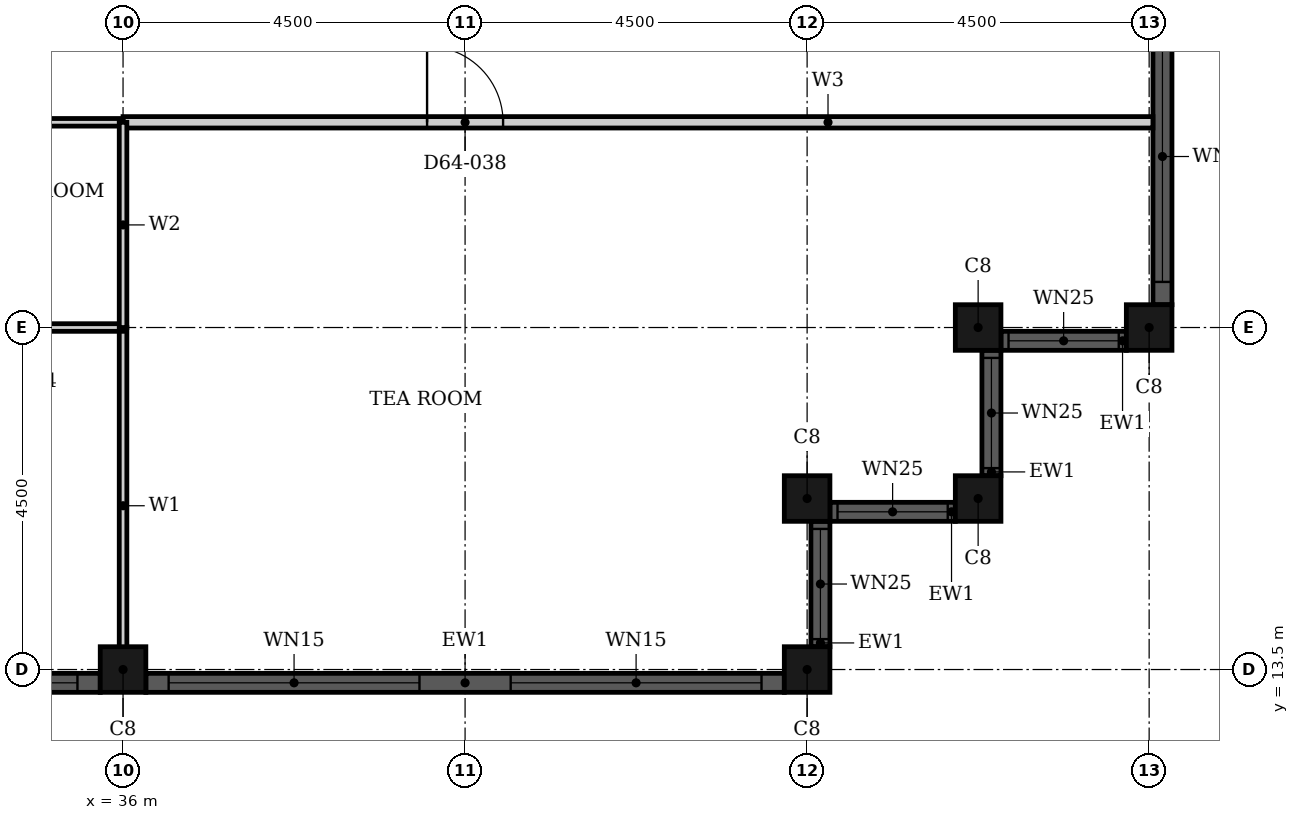
"""IFC4 building model, lengths in metres.
Left out: names, types, materials, properties, quantities, classifications, styles, units other than length and angle.
Written with IfcOpenShell. Run it as: python <this file> out.ifc"""

import sys

from ifc_helpers import new_model, si_unit, direction, frame, frame_2d, origin, origin_2d, place, context, subcontext, project, spatial, rectangle, hollow_rectangle, extrude, element, fill, save


model = new_model("IFC4")
c1 = context("Model", 3, precision=1e-05, world=origin(), true_north=direction((0.0, 1.0)))
c2 = subcontext(c1, "Body", "Model", "MODEL_VIEW")
j1 = project(units=[si_unit("LENGTHUNIT", "METRE"), si_unit("PLANEANGLEUNIT", "RADIAN")], contexts=[c1])
p1 = place(None, origin())
s1 = spatial("IfcSite", under=j1, at=p1, CompositionType="ELEMENT")
p2 = place(p1, origin())
s2 = spatial("IfcBuilding", under=s1, at=p2, CompositionType="ELEMENT")
p3 = place(p2, frame((0.0, 0.0, 252.7)))
s3 = spatial("IfcBuildingStorey", under=s2, at=p3, CompositionType="ELEMENT", Elevation=252.7)
for number, where, z_axis, x_axis in (
    (1, (36.0, 13.5, 0.0), (0.0, 0.0, 1.0), (1.0, 0.0, 0.0)),
    (2, (45.0, 13.5, 0.0), (0.0, 0.0, 1.0), (1.0, 0.0, 0.0)),
    (3, (45.0, 15.75, 0.0), (0.0, 0.0, 1.0), (1.0, 0.0, 0.0)),
    (4, (47.25, 15.75, 0.0), (0.0, 0.0, 1.0), (1.0, 0.0, 0.0)),
    (5, (47.25, 18.0, 0.0), (0.0, 0.0, 1.0), (1.0, 0.0, 0.0)),
    (6, (49.5, 18.0, 0.0), (0.0, 0.0, 1.0), (1.0, 0.0, 0.0)),
):
    element("IfcColumn", number, at=place(p3, frame(where, z_axis=z_axis, x_axis=x_axis)), inside=s3, PredefinedType="COLUMN", context=c2, shape_type="SweptSolid", body=[
        extrude(hollow_rectangle(XDim=0.6, YDim=0.6, WallThickness=0.02, at=origin_2d()), origin(), (0.0, 0.0, 1.0), 3.7),
    ])
p4 = place(p3, frame((27.3, 13.325, 0.0), z_axis=(0.0, 0.0, 1.0), x_axis=(1.0, 0.0, 0.0)))
e7 = element("IfcWall", 7, at=p4, inside=s3, PredefinedType="SOLIDWALL", context=c2, shape_type="SweptSolid", body=[
    extrude(rectangle(XDim=8.4, YDim=0.25, at=frame_2d((4.2, 0.0))), origin(), (0.0, 0.0, 1.0), 3.7),
])
p5 = place(p4, frame((0.3, 0.0, 0.45)))
e8 = element("IfcOpeningElement", 8, at=p5, cuts=e7, PredefinedType="OPENING", context=c2, shape_type="SweptSolid", body=[
    extrude(rectangle(XDim=3.3, YDim=2.3, at=frame_2d((1.65, 1.15))), frame((0.0, 0.135, 0.0), z_axis=(0.0, -1.0, 0.0), x_axis=(1.0, 0.0, 0.0)), (0.0, 0.0, 1.0), 0.27),
])
p6 = place(p4, frame((4.8, 0.0, 0.45)))
e9 = element("IfcOpeningElement", 9, at=p6, cuts=e7, PredefinedType="OPENING", context=c2, shape_type="SweptSolid", body=[
    extrude(rectangle(XDim=3.3, YDim=2.3, at=frame_2d((1.65, 1.15))), frame((0.0, 0.135, 0.0), z_axis=(0.0, -1.0, 0.0), x_axis=(1.0, 0.0, 0.0)), (0.0, 0.0, 1.0), 0.27),
])
p7 = place(p3, frame((36.3, 13.325, 0.0), z_axis=(0.0, 0.0, 1.0), x_axis=(1.0, 0.0, 0.0)))
e10 = element("IfcWall", 10, at=p7, inside=s3, PredefinedType="SOLIDWALL", context=c2, shape_type="SweptSolid", body=[
    extrude(rectangle(XDim=8.4, YDim=0.25, at=frame_2d((4.2, 0.0))), origin(), (0.0, 0.0, 1.0), 3.7),
])
p8 = place(p7, frame((0.3, 0.0, 0.45)))
e11 = element("IfcOpeningElement", 11, at=p8, cuts=e10, PredefinedType="OPENING", context=c2, shape_type="SweptSolid", body=[
    extrude(rectangle(XDim=3.3, YDim=2.3, at=frame_2d((1.65, 1.15))), frame((0.0, 0.135, 0.0), z_axis=(0.0, -1.0, 0.0), x_axis=(1.0, 0.0, 0.0)), (0.0, 0.0, 1.0), 0.27),
])
p9 = place(p7, frame((4.8, 0.0, 0.45)))
e12 = element("IfcOpeningElement", 12, at=p9, cuts=e10, PredefinedType="OPENING", context=c2, shape_type="SweptSolid", body=[
    extrude(rectangle(XDim=3.3, YDim=2.3, at=frame_2d((1.65, 1.15))), frame((0.0, 0.135, 0.0), z_axis=(0.0, -1.0, 0.0), x_axis=(1.0, 0.0, 0.0)), (0.0, 0.0, 1.0), 0.27),
])
p10 = place(p3, frame((45.175, 13.8, 0.0), z_axis=(0.0, 0.0, 1.0), x_axis=(0.0, 1.0, 0.0)))
e13 = element("IfcWall", 13, at=p10, inside=s3, PredefinedType="SOLIDWALL", context=c2, shape_type="SweptSolid", body=[
    extrude(rectangle(XDim=1.65, YDim=0.25, at=frame_2d((0.825, 0.0))), origin(), (0.0, 0.0, 1.0), 3.7),
])
p11 = place(p10, frame((0.1, 0.0, 0.9)))
e14 = element("IfcOpeningElement", 14, at=p11, cuts=e13, PredefinedType="OPENING", context=c2, shape_type="SweptSolid", body=[
    extrude(rectangle(XDim=1.45, YDim=1.85, at=frame_2d((0.725, 0.925))), frame((0.0, 0.135, 0.0), z_axis=(0.0, -1.0, 0.0), x_axis=(1.0, 0.0, 0.0)), (0.0, 0.0, 1.0), 0.27),
])
p12 = place(p3, frame((45.3, 15.575, 0.0), z_axis=(0.0, 0.0, 1.0), x_axis=(1.0, 0.0, 0.0)))
e15 = element("IfcWall", 15, at=p12, inside=s3, PredefinedType="SOLIDWALL", context=c2, shape_type="SweptSolid", body=[
    extrude(rectangle(XDim=1.65, YDim=0.25, at=frame_2d((0.825, 0.0))), origin(), (0.0, 0.0, 1.0), 3.7),
])
p13 = place(p12, frame((0.1, 0.0, 0.9)))
e16 = element("IfcOpeningElement", 16, at=p13, cuts=e15, PredefinedType="OPENING", context=c2, shape_type="SweptSolid", body=[
    extrude(rectangle(XDim=1.45, YDim=1.85, at=frame_2d((0.725, 0.925))), frame((0.0, 0.135, 0.0), z_axis=(0.0, -1.0, 0.0), x_axis=(1.0, 0.0, 0.0)), (0.0, 0.0, 1.0), 0.27),
])
p14 = place(p3, frame((47.425, 16.05, 0.0), z_axis=(0.0, 0.0, 1.0), x_axis=(0.0, 1.0, 0.0)))
e17 = element("IfcWall", 17, at=p14, inside=s3, PredefinedType="SOLIDWALL", context=c2, shape_type="SweptSolid", body=[
    extrude(rectangle(XDim=1.65, YDim=0.25, at=frame_2d((0.825, 0.0))), origin(), (0.0, 0.0, 1.0), 3.7),
])
p15 = place(p14, frame((0.1, 0.0, 0.9)))
e18 = element("IfcOpeningElement", 18, at=p15, cuts=e17, PredefinedType="OPENING", context=c2, shape_type="SweptSolid", body=[
    extrude(rectangle(XDim=1.45, YDim=1.85, at=frame_2d((0.725, 0.925))), frame((0.0, 0.135, 0.0), z_axis=(0.0, -1.0, 0.0), x_axis=(1.0, 0.0, 0.0)), (0.0, 0.0, 1.0), 0.27),
])
p16 = place(p3, frame((47.55, 17.825, 0.0), z_axis=(0.0, 0.0, 1.0), x_axis=(1.0, 0.0, 0.0)))
e19 = element("IfcWall", 19, at=p16, inside=s3, PredefinedType="SOLIDWALL", context=c2, shape_type="SweptSolid", body=[
    extrude(rectangle(XDim=1.65, YDim=0.25, at=frame_2d((0.825, 0.0))), origin(), (0.0, 0.0, 1.0), 3.7),
])
p17 = place(p16, frame((0.1, 0.0, 0.9)))
e20 = element("IfcOpeningElement", 20, at=p17, cuts=e19, PredefinedType="OPENING", context=c2, shape_type="SweptSolid", body=[
    extrude(rectangle(XDim=1.45, YDim=1.85, at=frame_2d((0.725, 0.925))), frame((0.0, 0.135, 0.0), z_axis=(0.0, -1.0, 0.0), x_axis=(1.0, 0.0, 0.0)), (0.0, 0.0, 1.0), 0.27),
])
p18 = place(p3, frame((49.675, 18.3, 0.0), z_axis=(0.0, 0.0, 1.0), x_axis=(0.0, 1.0, 0.0)))
e21 = element("IfcWall", 21, at=p18, inside=s3, PredefinedType="SOLIDWALL", context=c2, shape_type="SweptSolid", body=[
    extrude(rectangle(XDim=8.4, YDim=0.25, at=frame_2d((4.2, 0.0))), origin(), (0.0, 0.0, 1.0), 3.7),
])
p19 = place(p18, frame((0.3, 0.0, 0.45)))
e22 = element("IfcOpeningElement", 22, at=p19, cuts=e21, PredefinedType="OPENING", context=c2, shape_type="SweptSolid", body=[
    extrude(rectangle(XDim=3.3, YDim=2.3, at=frame_2d((1.65, 1.15))), frame((0.0, 0.135, 0.0), z_axis=(0.0, -1.0, 0.0), x_axis=(1.0, 0.0, 0.0)), (0.0, 0.0, 1.0), 0.27),
])
p20 = place(p18, frame((4.8, 0.0, 0.45)))
e23 = element("IfcOpeningElement", 23, at=p20, cuts=e21, PredefinedType="OPENING", context=c2, shape_type="SweptSolid", body=[
    extrude(rectangle(XDim=3.3, YDim=2.3, at=frame_2d((1.65, 1.15))), frame((0.0, 0.135, 0.0), z_axis=(0.0, -1.0, 0.0), x_axis=(1.0, 0.0, 0.0)), (0.0, 0.0, 1.0), 0.27),
])
p21 = place(p3, frame((36.0, 20.7, 0.0), z_axis=(0.0, 0.0, 1.0), x_axis=(1.0, 0.0, 0.0)))
e24 = element("IfcWall", 24, at=p21, inside=s3, PredefinedType="PARTITIONING", context=c2, shape_type="SweptSolid", body=[
    extrude(rectangle(XDim=13.55, YDim=0.15, at=frame_2d((6.775, 0.0))), origin(), (0.0, 0.0, 1.0), 3.4),
])
p22 = place(p21, frame((4.0, 0.0, 0.0)))
e25 = element("IfcOpeningElement", 25, at=p22, cuts=e24, PredefinedType="OPENING", context=c2, shape_type="SweptSolid", body=[
    extrude(rectangle(XDim=1.0, YDim=2.1, at=frame_2d((0.5, 1.05))), frame((0.0, 0.085, 0.0), z_axis=(0.0, -1.0, 0.0), x_axis=(1.0, 0.0, 0.0)), (0.0, 0.0, 1.0), 0.17),
])
p23 = place(p3, frame((36.0, 13.31, 0.0), z_axis=(0.0, 0.0, 1.0), x_axis=(0.0, 1.0, 0.0)))
e26 = element("IfcWall", 26, at=p23, inside=s3, PredefinedType="PARTITIONING", context=c2, shape_type="SweptSolid", body=[
    extrude(rectangle(XDim=4.69, YDim=0.1, at=frame_2d((2.345, 0.0))), origin(), (0.0, 0.0, 1.0), 3.4),
])
for number, where, z_axis, x_axis in (
    (27, (33.6, 18.0, 0.0), (0.0, 0.0, 1.0), (1.0, 0.0, 0.0)),
    (28, (33.6, 20.7, 0.0), (0.0, 0.0, 1.0), (1.0, 0.0, 0.0)),
):
    element("IfcWall", number, at=place(p3, frame(where, z_axis=z_axis, x_axis=x_axis)), inside=s3, PredefinedType="PARTITIONING", context=c2, shape_type="SweptSolid", body=[
        extrude(rectangle(XDim=2.4, YDim=0.1, at=frame_2d((1.2, 0.0))), origin(), (0.0, 0.0, 1.0), 3.4),
    ])
p24 = place(p3, frame((36.0, 18.0, 0.0), z_axis=(0.0, 0.0, 1.0), x_axis=(0.0, 1.0, 0.0)))
e29 = element("IfcWall", 29, at=p24, inside=s3, PredefinedType="PARTITIONING", context=c2, shape_type="SweptSolid", body=[
    extrude(rectangle(XDim=2.7, YDim=0.1, at=frame_2d((1.35, 0.0))), origin(), (0.0, 0.0, 1.0), 3.4),
])
p25 = place(p6, origin())
e30 = element("IfcWindow", 30, at=p25, inside=s3, PartitioningType="SINGLE_PANEL", PredefinedType="WINDOW", context=c2, shape_type="SweptSolid", body=[
    extrude(rectangle(XDim=3.3, YDim=2.3, at=frame_2d((1.65, 1.15))), frame((0.0, 0.03, 0.0), z_axis=(0.0, -1.0, 0.0), x_axis=(1.0, 0.0, 0.0)), (0.0, 0.0, 1.0), 0.06),
])
fill(e9, e30)
p26 = place(p8, origin())
e31 = element("IfcWindow", 31, at=p26, inside=s3, PartitioningType="SINGLE_PANEL", PredefinedType="WINDOW", context=c2, shape_type="SweptSolid", body=[
    extrude(rectangle(XDim=3.3, YDim=2.3, at=frame_2d((1.65, 1.15))), frame((0.0, 0.03, 0.0), z_axis=(0.0, -1.0, 0.0), x_axis=(1.0, 0.0, 0.0)), (0.0, 0.0, 1.0), 0.06),
])
fill(e11, e31)
p27 = place(p9, origin())
e32 = element("IfcWindow", 32, at=p27, inside=s3, PartitioningType="SINGLE_PANEL", PredefinedType="WINDOW", context=c2, shape_type="SweptSolid", body=[
    extrude(rectangle(XDim=3.3, YDim=2.3, at=frame_2d((1.65, 1.15))), frame((0.0, 0.03, 0.0), z_axis=(0.0, -1.0, 0.0), x_axis=(1.0, 0.0, 0.0)), (0.0, 0.0, 1.0), 0.06),
])
fill(e12, e32)
p28 = place(p11, origin())
e33 = element("IfcWindow", 33, at=p28, inside=s3, PartitioningType="SINGLE_PANEL", PredefinedType="WINDOW", context=c2, shape_type="SweptSolid", body=[
    extrude(rectangle(XDim=1.45, YDim=1.85, at=frame_2d((0.725, 0.925))), frame((0.0, 0.03, 0.0), z_axis=(0.0, -1.0, 0.0), x_axis=(1.0, 0.0, 0.0)), (0.0, 0.0, 1.0), 0.06),
])
fill(e14, e33)
p29 = place(p13, origin())
e34 = element("IfcWindow", 34, at=p29, inside=s3, PartitioningType="SINGLE_PANEL", PredefinedType="WINDOW", context=c2, shape_type="SweptSolid", body=[
    extrude(rectangle(XDim=1.45, YDim=1.85, at=frame_2d((0.725, 0.925))), frame((0.0, 0.03, 0.0), z_axis=(0.0, -1.0, 0.0), x_axis=(1.0, 0.0, 0.0)), (0.0, 0.0, 1.0), 0.06),
])
fill(e16, e34)
p30 = place(p15, origin())
e35 = element("IfcWindow", 35, at=p30, inside=s3, PartitioningType="SINGLE_PANEL", PredefinedType="WINDOW", context=c2, shape_type="SweptSolid", body=[
    extrude(rectangle(XDim=1.45, YDim=1.85, at=frame_2d((0.725, 0.925))), frame((0.0, 0.03, 0.0), z_axis=(0.0, -1.0, 0.0), x_axis=(1.0, 0.0, 0.0)), (0.0, 0.0, 1.0), 0.06),
])
fill(e18, e35)
p31 = place(p17, origin())
e36 = element("IfcWindow", 36, at=p31, inside=s3, PartitioningType="SINGLE_PANEL", PredefinedType="WINDOW", context=c2, shape_type="SweptSolid", body=[
    extrude(rectangle(XDim=1.45, YDim=1.85, at=frame_2d((0.725, 0.925))), frame((0.0, 0.03, 0.0), z_axis=(0.0, -1.0, 0.0), x_axis=(1.0, 0.0, 0.0)), (0.0, 0.0, 1.0), 0.06),
])
fill(e20, e36)
p32 = place(p19, origin())
e37 = element("IfcWindow", 37, at=p32, inside=s3, PartitioningType="SINGLE_PANEL", PredefinedType="WINDOW", context=c2, shape_type="SweptSolid", body=[
    extrude(rectangle(XDim=3.3, YDim=2.3, at=frame_2d((1.65, 1.15))), frame((0.0, 0.03, 0.0), z_axis=(0.0, -1.0, 0.0), x_axis=(1.0, 0.0, 0.0)), (0.0, 0.0, 1.0), 0.06),
])
fill(e22, e37)
p33 = place(p22, origin())
e38 = element("IfcDoor", 38, at=p33, inside=s3, OperationType="SINGLE_SWING_LEFT", PredefinedType="DOOR", context=c2, shape_type="SweptSolid", body=[
    extrude(rectangle(XDim=1.0, YDim=2.1, at=frame_2d((0.5, 1.05))), frame((0.0, 0.025, 0.0), z_axis=(0.0, -1.0, 0.0), x_axis=(1.0, 0.0, 0.0)), (0.0, 0.0, 1.0), 0.05),
])
fill(e25, e38)
save(model, sys.argv[1])
